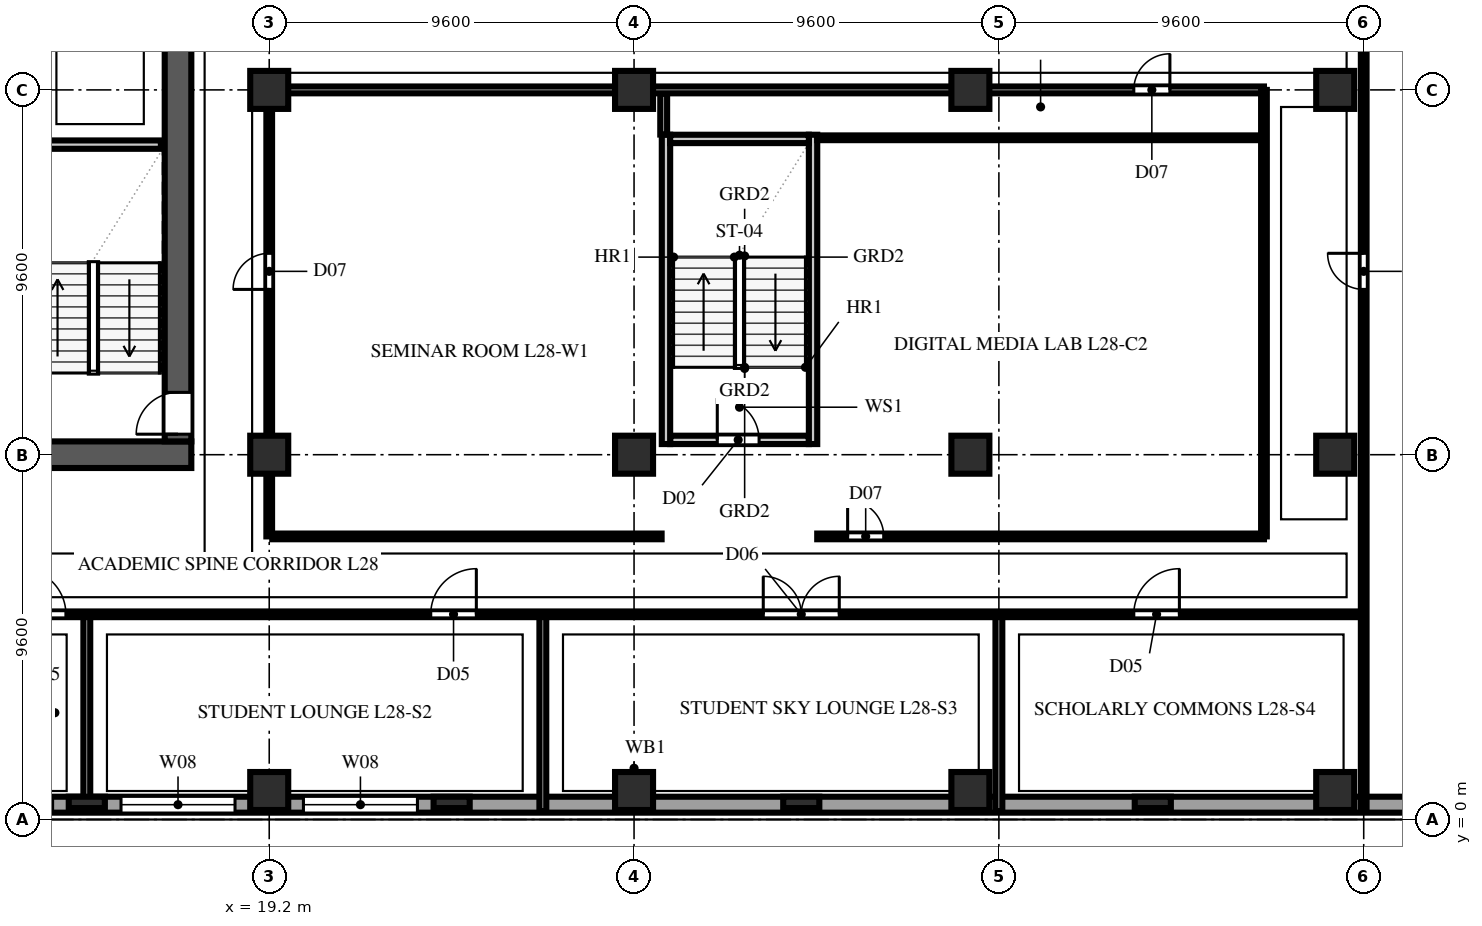
"""IFC4 building model, lengths in metres.
Left out: names, types, materials, properties, quantities, classifications, styles, units other than length and angle.
Written with IfcOpenShell. Run it as: python <this file> out.ifc"""

import sys

from ifc_helpers import new_model, si_unit, direction, frame, frame_2d, origin, origin_2d, place, context, subcontext, project, spatial, rectangle, extrude, element, fill, save


model = new_model("IFC4")
c1 = context("Model", 3, precision=1e-05, world=origin(), true_north=direction((0.0, 1.0)))
c2 = subcontext(c1, "Body", "Model", "MODEL_VIEW")
j1 = project(units=[si_unit("LENGTHUNIT", "METRE"), si_unit("PLANEANGLEUNIT", "RADIAN")], contexts=[c1])
p1 = place(None, origin())
s1 = spatial("IfcSite", under=j1, at=p1, CompositionType="ELEMENT")
p2 = place(p1, origin())
s2 = spatial("IfcBuilding", under=s1, at=p2, CompositionType="ELEMENT")
p3 = place(p2, frame((0.0, 0.0, 112.8)))
s3 = spatial("IfcBuildingStorey", under=s2, at=p3, CompositionType="ELEMENT", Elevation=112.8)
p4 = place(p3, frame((2.55, 9.6, 0.0), z_axis=(0.0, 0.0, 1.0), x_axis=(1.0, 0.0, 0.0)))
e1 = element("IfcWall", 1, at=p4, inside=s3, PredefinedType="SHEAR", context=c2, shape_type="SweptSolid", body=[
    extrude(rectangle(XDim=14.6, YDim=0.7, at=frame_2d((7.3, 0.0))), origin(), (0.0, 0.0, 1.0), 3.54),
])
p5 = place(p3, frame((16.8, 9.95, 0.0), z_axis=(0.0, 0.0, 1.0), x_axis=(0.0, 1.0, 0.0)))
e2 = element("IfcWall", 2, at=p5, inside=s3, PredefinedType="SHEAR", context=c2, shape_type="SweptSolid", body=[
    extrude(rectangle(XDim=12.45, YDim=0.7, at=frame_2d((6.225, 0.0))), origin(), (0.0, 0.0, 1.0), 3.54),
])
p6 = place(p5, frame((0.19, 0.0, 0.0)))
e3 = element("IfcOpeningElement", 3, at=p6, cuts=e2, PredefinedType="OPENING", context=c2, shape_type="SweptSolid", body=[
    extrude(rectangle(XDim=1.1, YDim=2.2, at=frame_2d((0.55, 1.1))), frame((0.0, 0.362, 0.0), z_axis=(0.0, -1.0, 0.0), x_axis=(1.0, 0.0, 0.0)), (0.0, 0.0, 1.0), 0.724),
])
for number, where, z_axis, x_axis in (
    (4, (19.2, 0.75, 0.0), (0.0, 0.0, 1.0), (1.0, 0.0, 0.0)),
    (5, (19.2, 9.6, 0.0), (0.0, 0.0, 1.0), (1.0, 0.0, 0.0)),
    (6, (19.2, 19.2, 0.0), (0.0, 0.0, 1.0), (1.0, 0.0, 0.0)),
    (7, (28.8, 0.75, 0.0), (0.0, 0.0, 1.0), (1.0, 0.0, 0.0)),
    (8, (28.8, 9.6, 0.0), (0.0, 0.0, 1.0), (1.0, 0.0, 0.0)),
    (9, (28.8, 19.2, 0.0), (0.0, 0.0, 1.0), (1.0, 0.0, 0.0)),
    (10, (37.65, 0.75, 0.0), (0.0, 0.0, 1.0), (1.0, 0.0, 0.0)),
    (11, (37.65, 9.6, 0.0), (0.0, 0.0, 1.0), (1.0, 0.0, 0.0)),
    (12, (37.65, 19.2, 0.0), (0.0, 0.0, 1.0), (1.0, 0.0, 0.0)),
    (13, (47.25, 0.75, 0.0), (0.0, 0.0, 1.0), (1.0, 0.0, 0.0)),
    (14, (47.25, 9.6, 0.0), (0.0, 0.0, 1.0), (1.0, 0.0, 0.0)),
    (15, (47.25, 19.2, 0.0), (0.0, 0.0, 1.0), (1.0, 0.0, 0.0)),
):
    element("IfcColumn", number, at=place(p3, frame(where, z_axis=z_axis, x_axis=x_axis)), inside=s3, PredefinedType="COLUMN", context=c2, shape_type="SweptSolid", body=[
        extrude(rectangle(XDim=1.0, YDim=1.0, at=origin_2d()), origin(), (0.0, 0.0, 1.0), 3.8),
    ])
for number, where, z_axis, x_axis in (
    (16, (14.4, 0.45, 0.0), (0.0, 0.0, 1.0), (1.0, 0.0, 0.0)),
    (17, (24.0, 0.45, 0.0), (0.0, 0.0, 1.0), (1.0, 0.0, 0.0)),
    (18, (33.2, 0.45, 0.0), (0.0, 0.0, 1.0), (1.0, 0.0, 0.0)),
    (19, (42.45, 0.45, 0.0), (0.0, 0.0, 1.0), (1.0, 0.0, 0.0)),
):
    element("IfcColumn", number, at=place(p3, frame(where, z_axis=z_axis, x_axis=x_axis)), inside=s3, PredefinedType="PILASTER", context=c2, shape_type="SweptSolid", body=[
        extrude(rectangle(XDim=0.95, YDim=0.3, at=origin_2d()), origin(), (0.0, 0.0, 1.0), 3.8),
    ])
p7 = place(p3, frame((1.84, 0.39, 0.0), z_axis=(0.0, 0.0, 1.0), x_axis=(1.0, 0.0, 0.0)))
e20 = element("IfcWall", 20, at=p7, inside=s3, PredefinedType="SOLIDWALL", context=c2, shape_type="SweptSolid", body=[
    extrude(rectangle(XDim=53.92, YDim=0.42, at=frame_2d((26.96, 0.0))), origin(), (0.0, 0.0, 1.0), 3.54),
])
p8 = place(p7, frame((3.86, 0.0, 0.75)))
e21 = element("IfcOpeningElement", 21, at=p8, cuts=e20, PredefinedType="OPENING", context=c2, shape_type="SweptSolid", body=[
    extrude(rectangle(XDim=3.0, YDim=1.9, at=frame_2d((1.5, 0.95))), frame((0.0, 0.222, 0.0), z_axis=(0.0, -1.0, 0.0), x_axis=(1.0, 0.0, 0.0)), (0.0, 0.0, 1.0), 0.444),
])
p9 = place(p7, frame((8.66, 0.0, 0.75)))
e22 = element("IfcOpeningElement", 22, at=p9, cuts=e20, PredefinedType="OPENING", context=c2, shape_type="SweptSolid", body=[
    extrude(rectangle(XDim=3.0, YDim=1.9, at=frame_2d((1.5, 0.95))), frame((0.0, 0.222, 0.0), z_axis=(0.0, -1.0, 0.0), x_axis=(1.0, 0.0, 0.0)), (0.0, 0.0, 1.0), 0.444),
])
p10 = place(p7, frame((13.46, 0.0, 0.75)))
e23 = element("IfcOpeningElement", 23, at=p10, cuts=e20, PredefinedType="OPENING", context=c2, shape_type="SweptSolid", body=[
    extrude(rectangle(XDim=3.0, YDim=1.9, at=frame_2d((1.5, 0.95))), frame((0.0, 0.222, 0.0), z_axis=(0.0, -1.0, 0.0), x_axis=(1.0, 0.0, 0.0)), (0.0, 0.0, 1.0), 0.444),
])
p11 = place(p7, frame((18.26, 0.0, 0.75)))
e24 = element("IfcOpeningElement", 24, at=p11, cuts=e20, PredefinedType="OPENING", context=c2, shape_type="SweptSolid", body=[
    extrude(rectangle(XDim=3.0, YDim=1.9, at=frame_2d((1.5, 0.95))), frame((0.0, 0.222, 0.0), z_axis=(0.0, -1.0, 0.0), x_axis=(1.0, 0.0, 0.0)), (0.0, 0.0, 1.0), 0.444),
])
p12 = place(p3, frame((12.75, 17.76, 0.0), z_axis=(0.0, 0.0, 1.0), x_axis=(1.0, 0.0, 0.0)))
e25 = element("IfcWall", 25, at=p12, inside=s3, PredefinedType="SOLIDWALL", context=c2, shape_type="SweptSolid", body=[
    extrude(rectangle(XDim=3.6, YDim=0.22, at=frame_2d((1.8, 0.0))), origin(), (0.0, 0.0, 1.0), 3.54),
])
p13 = place(p3, frame((29.75, 9.99, 0.0), z_axis=(0.0, 0.0, 1.0), x_axis=(1.0, 0.0, 0.0)))
e26 = element("IfcWall", 26, at=p13, inside=s3, PredefinedType="SOLIDWALL", context=c2, shape_type="SweptSolid", body=[
    extrude(rectangle(XDim=3.65, YDim=0.22, at=frame_2d((1.825, 0.0))), origin(), (0.0, 0.0, 1.0), 3.54),
])
p14 = place(p13, frame((1.24, 0.0, 0.0)))
e27 = element("IfcOpeningElement", 27, at=p14, cuts=e26, PredefinedType="OPENING", context=c2, shape_type="SweptSolid", body=[
    extrude(rectangle(XDim=1.1, YDim=2.2, at=frame_2d((0.55, 1.1))), frame((0.0, 0.122, 0.0), z_axis=(0.0, -1.0, 0.0), x_axis=(1.0, 0.0, 0.0)), (0.0, 0.0, 1.0), 0.244),
])
for number, where, z_axis, x_axis in (
    (28, (29.64, 9.88, 0.0), (0.0, 0.0, 1.0), (0.0, 1.0, 0.0)),
    (29, (33.51, 9.88, 0.0), (0.0, 0.0, 1.0), (0.0, 1.0, 0.0)),
):
    element("IfcWall", number, at=place(p3, frame(where, z_axis=z_axis, x_axis=x_axis)), inside=s3, PredefinedType="SOLIDWALL", context=c2, shape_type="SweptSolid", body=[
        extrude(rectangle(XDim=8.14, YDim=0.22, at=frame_2d((4.07, 0.0))), origin(), (0.0, 0.0, 1.0), 3.54),
    ])
p15 = place(p3, frame((29.75, 17.91, 0.0), z_axis=(0.0, 0.0, 1.0), x_axis=(1.0, 0.0, 0.0)))
e30 = element("IfcWall", 30, at=p15, inside=s3, PredefinedType="SOLIDWALL", context=c2, shape_type="SweptSolid", body=[
    extrude(rectangle(XDim=3.65, YDim=0.22, at=frame_2d((1.825, 0.0))), origin(), (0.0, 0.0, 1.0), 3.54),
])
for number, where, z_axis, x_axis in (
    (31, (14.4, 0.22, 0.0), (0.0, 0.0, 1.0), (0.0, 1.0, 0.0)),
    (32, (26.4, 0.22, 0.0), (0.0, 0.0, 1.0), (0.0, 1.0, 0.0)),
    (33, (38.4, 0.22, 0.0), (0.0, 0.0, 1.0), (0.0, 1.0, 0.0)),
):
    element("IfcWall", number, at=place(p3, frame(where, z_axis=z_axis, x_axis=x_axis)), inside=s3, PredefinedType="PARTITIONING", context=c2, shape_type="SweptSolid", body=[
        extrude(rectangle(XDim=5.18, YDim=0.18, at=frame_2d((2.59, 0.0))), origin(), (0.0, 0.0, 1.0), 3.54),
    ])
p16 = place(p3, frame((0.22, 5.4, 0.0), z_axis=(0.0, 0.0, 1.0), x_axis=(1.0, 0.0, 0.0)))
e34 = element("IfcWall", 34, at=p16, inside=s3, PredefinedType="PARTITIONING", context=c2, shape_type="SweptSolid", body=[
    extrude(rectangle(XDim=47.78, YDim=0.15, at=frame_2d((23.89, 0.0))), origin(), (0.0, 0.0, 1.0), 3.54),
])
p17 = place(p16, frame((12.43, 0.0, 0.0)))
e35 = element("IfcOpeningElement", 35, at=p17, cuts=e34, PredefinedType="OPENING", context=c2, shape_type="SweptSolid", body=[
    extrude(rectangle(XDim=1.2, YDim=2.2, at=frame_2d((0.6, 1.1))), frame((0.0, 0.087, 0.0), z_axis=(0.0, -1.0, 0.0), x_axis=(1.0, 0.0, 0.0)), (0.0, 0.0, 1.0), 0.174),
])
p18 = place(p16, frame((23.23, 0.0, 0.0)))
e36 = element("IfcOpeningElement", 36, at=p18, cuts=e34, PredefinedType="OPENING", context=c2, shape_type="SweptSolid", body=[
    extrude(rectangle(XDim=1.2, YDim=2.2, at=frame_2d((0.6, 1.1))), frame((0.0, 0.087, 0.0), z_axis=(0.0, -1.0, 0.0), x_axis=(1.0, 0.0, 0.0)), (0.0, 0.0, 1.0), 0.174),
])
p19 = place(p16, frame((31.98, 0.0, 0.0)))
e37 = element("IfcOpeningElement", 37, at=p19, cuts=e34, PredefinedType="OPENING", context=c2, shape_type="SweptSolid", body=[
    extrude(rectangle(XDim=2.0, YDim=2.3, at=frame_2d((1.0, 1.15))), frame((0.0, 0.087, 0.0), z_axis=(0.0, -1.0, 0.0), x_axis=(1.0, 0.0, 0.0)), (0.0, 0.0, 1.0), 0.174),
])
p20 = place(p16, frame((41.73, 0.0, 0.0)))
e38 = element("IfcOpeningElement", 38, at=p20, cuts=e34, PredefinedType="OPENING", context=c2, shape_type="SweptSolid", body=[
    extrude(rectangle(XDim=1.2, YDim=2.2, at=frame_2d((0.6, 1.1))), frame((0.0, 0.087, 0.0), z_axis=(0.0, -1.0, 0.0), x_axis=(1.0, 0.0, 0.0)), (0.0, 0.0, 1.0), 0.174),
])
p21 = place(p3, frame((48.0, 0.22, 0.0), z_axis=(0.0, 0.0, 1.0), x_axis=(0.0, 1.0, 0.0)))
e39 = element("IfcWall", 39, at=p21, inside=s3, PredefinedType="PARTITIONING", context=c2, shape_type="SweptSolid", body=[
    extrude(rectangle(XDim=37.96, YDim=0.15, at=frame_2d((18.98, 0.0))), origin(), (0.0, 0.0, 1.0), 3.54),
])
p22 = place(p21, frame((13.73, 0.0, 0.0)))
e40 = element("IfcOpeningElement", 40, at=p22, cuts=e39, PredefinedType="OPENING", context=c2, shape_type="SweptSolid", body=[
    extrude(rectangle(XDim=0.95, YDim=2.15, at=frame_2d((0.475, 1.075))), frame((0.0, 0.087, 0.0), z_axis=(0.0, -1.0, 0.0), x_axis=(1.0, 0.0, 0.0)), (0.0, 0.0, 1.0), 0.174),
])
p23 = place(p3, frame((19.2, 7.45, 0.0), z_axis=(0.0, 0.0, 1.0), x_axis=(0.0, 1.0, 0.0)))
e41 = element("IfcWall", 41, at=p23, inside=s3, PredefinedType="PARTITIONING", context=c2, shape_type="SweptSolid", body=[
    extrude(rectangle(XDim=11.75, YDim=0.15, at=frame_2d((5.875, 0.0))), origin(), (0.0, 0.0, 1.0), 2.845),
])
p24 = place(p23, frame((6.5, 0.0, 0.0)))
e42 = element("IfcOpeningElement", 42, at=p24, cuts=e41, PredefinedType="OPENING", context=c2, shape_type="SweptSolid", body=[
    extrude(rectangle(XDim=0.95, YDim=2.15, at=frame_2d((0.475, 1.075))), frame((0.0, 0.087, 0.0), z_axis=(0.0, -1.0, 0.0), x_axis=(1.0, 0.0, 0.0)), (0.0, 0.0, 1.0), 0.174),
])
p25 = place(p3, frame((29.58, 18.025, 0.0), z_axis=(0.0, 0.0, 1.0), x_axis=(0.0, 1.0, 0.0)))
e43 = element("IfcWall", 43, at=p25, inside=s3, PredefinedType="PARTITIONING", context=c2, shape_type="SweptSolid", body=[
    extrude(rectangle(XDim=1.08, YDim=0.18, at=frame_2d((0.54, 0.0))), origin(), (0.0, 0.0, 1.0), 3.54),
])
p26 = place(p3, frame((19.28, 19.2, 0.0), z_axis=(0.0, 0.0, 1.0), x_axis=(1.0, 0.0, 0.0)))
e44 = element("IfcWall", 44, at=p26, inside=s3, PredefinedType="PARTITIONING", context=c2, shape_type="SweptSolid", body=[
    extrude(rectangle(XDim=26.095, YDim=0.18, at=frame_2d((13.047, 0.0))), origin(), (0.0, 0.0, 1.0), 2.845),
])
p27 = place(p26, frame((22.67, 0.0, 0.0)))
e45 = element("IfcOpeningElement", 45, at=p27, cuts=e44, PredefinedType="OPENING", context=c2, shape_type="SweptSolid", body=[
    extrude(rectangle(XDim=0.95, YDim=2.15, at=frame_2d((0.475, 1.075))), frame((0.0, 0.102, 0.0), z_axis=(0.0, -1.0, 0.0), x_axis=(1.0, 0.0, 0.0)), (0.0, 0.0, 1.0), 0.204),
])
p28 = place(p3, frame((19.28, 7.45, 0.0), z_axis=(0.0, 0.0, 1.0), x_axis=(1.0, 0.0, 0.0)))
e46 = element("IfcWall", 46, at=p28, inside=s3, PredefinedType="PARTITIONING", context=c2, shape_type="SweptSolid", body=[
    extrude(rectangle(XDim=10.245, YDim=0.15, at=frame_2d((5.123, 0.0))), origin(), (0.0, 0.0, 1.0), 3.54),
])
p29 = place(p3, frame((33.62, 17.94, 0.0), z_axis=(0.0, 0.0, 1.0), x_axis=(1.0, 0.0, 0.0)))
e47 = element("IfcWall", 47, at=p29, inside=s3, PredefinedType="PARTITIONING", context=c2, shape_type="SweptSolid", body=[
    extrude(rectangle(XDim=11.755, YDim=0.125, at=frame_2d((5.877, 0.0))), origin(), (0.0, 0.0, 1.0), 3.54),
])
p30 = place(p3, frame((33.62, 7.45, 0.0), z_axis=(0.0, 0.0, 1.0), x_axis=(1.0, 0.0, 0.0)))
e48 = element("IfcWall", 48, at=p30, inside=s3, PredefinedType="PARTITIONING", context=c2, shape_type="SweptSolid", body=[
    extrude(rectangle(XDim=11.755, YDim=0.15, at=frame_2d((5.877, 0.0))), origin(), (0.0, 0.0, 1.0), 3.54),
])
p31 = place(p30, frame((0.8, 0.0, 0.0)))
e49 = element("IfcOpeningElement", 49, at=p31, cuts=e48, PredefinedType="OPENING", context=c2, shape_type="SweptSolid", body=[
    extrude(rectangle(XDim=0.95, YDim=2.15, at=frame_2d((0.475, 1.075))), frame((0.0, 0.087, 0.0), z_axis=(0.0, -1.0, 0.0), x_axis=(1.0, 0.0, 0.0)), (0.0, 0.0, 1.0), 0.174),
])
p32 = place(p3, frame((45.375, 7.45, 0.0), z_axis=(0.0, 0.0, 1.0), x_axis=(0.0, 1.0, 0.0)))
e50 = element("IfcWall", 50, at=p32, inside=s3, PredefinedType="PARTITIONING", context=c2, shape_type="SweptSolid", body=[
    extrude(rectangle(XDim=11.75, YDim=0.15, at=frame_2d((5.875, 0.0))), origin(), (0.0, 0.0, 1.0), 3.54),
])
p33 = place(p9, origin())
e51 = element("IfcWindow", 51, at=p33, inside=s3, PartitioningType="TRIPLE_PANEL_VERTICAL", PredefinedType="WINDOW", context=c2, shape_type="SweptSolid", body=[
    extrude(rectangle(XDim=3.0, YDim=1.9, at=frame_2d((1.5, 0.95))), frame((0.0, 0.11, 0.0), z_axis=(0.0, -1.0, 0.0), x_axis=(1.0, 0.0, 0.0)), (0.0, 0.0, 1.0), 0.06),
])
fill(e22, e51)
p34 = place(p10, origin())
e52 = element("IfcWindow", 52, at=p34, inside=s3, PartitioningType="TRIPLE_PANEL_VERTICAL", PredefinedType="WINDOW", context=c2, shape_type="SweptSolid", body=[
    extrude(rectangle(XDim=3.0, YDim=1.9, at=frame_2d((1.5, 0.95))), frame((0.0, 0.11, 0.0), z_axis=(0.0, -1.0, 0.0), x_axis=(1.0, 0.0, 0.0)), (0.0, 0.0, 1.0), 0.06),
])
fill(e23, e52)
p35 = place(p11, origin())
e53 = element("IfcWindow", 53, at=p35, inside=s3, PartitioningType="TRIPLE_PANEL_VERTICAL", PredefinedType="WINDOW", context=c2, shape_type="SweptSolid", body=[
    extrude(rectangle(XDim=3.0, YDim=1.9, at=frame_2d((1.5, 0.95))), frame((0.0, 0.11, 0.0), z_axis=(0.0, -1.0, 0.0), x_axis=(1.0, 0.0, 0.0)), (0.0, 0.0, 1.0), 0.06),
])
fill(e24, e53)
p36 = place(p6, origin())
e54 = element("IfcDoor", 54, at=p36, inside=s3, OperationType="SINGLE_SWING_LEFT", PredefinedType="DOOR", context=c2, shape_type="SweptSolid", body=[
    extrude(rectangle(XDim=1.1, YDim=2.2, at=frame_2d((0.55, 1.1))), frame((0.0, 0.025, 0.0), z_axis=(0.0, -1.0, 0.0), x_axis=(1.0, 0.0, 0.0)), (0.0, 0.0, 1.0), 0.05),
])
fill(e3, e54)
p37 = place(p14, origin())
e55 = element("IfcDoor", 55, at=p37, inside=s3, OperationType="SINGLE_SWING_LEFT", PredefinedType="DOOR", context=c2, shape_type="SweptSolid", body=[
    extrude(rectangle(XDim=1.1, YDim=2.2, at=frame_2d((0.55, 1.1))), frame((0.0, 0.025, 0.0), z_axis=(0.0, -1.0, 0.0), x_axis=(1.0, 0.0, 0.0)), (0.0, 0.0, 1.0), 0.05),
])
fill(e27, e55)
p38 = place(p17, origin())
e56 = element("IfcDoor", 56, at=p38, inside=s3, OperationType="SINGLE_SWING_LEFT", PredefinedType="DOOR", context=c2, shape_type="SweptSolid", body=[
    extrude(rectangle(XDim=1.2, YDim=2.2, at=frame_2d((0.6, 1.1))), frame((0.0, 0.025, 0.0), z_axis=(0.0, -1.0, 0.0), x_axis=(1.0, 0.0, 0.0)), (0.0, 0.0, 1.0), 0.05),
])
fill(e35, e56)
p39 = place(p18, origin())
e57 = element("IfcDoor", 57, at=p39, inside=s3, OperationType="SINGLE_SWING_RIGHT", PredefinedType="DOOR", context=c2, shape_type="SweptSolid", body=[
    extrude(rectangle(XDim=1.2, YDim=2.2, at=frame_2d((0.6, 1.1))), frame((0.0, 0.025, 0.0), z_axis=(0.0, -1.0, 0.0), x_axis=(1.0, 0.0, 0.0)), (0.0, 0.0, 1.0), 0.05),
])
fill(e36, e57)
p40 = place(p19, origin())
e58 = element("IfcDoor", 58, at=p40, inside=s3, OperationType="DOUBLE_SWING_LEFT", PredefinedType="DOOR", context=c2, shape_type="SweptSolid", body=[
    extrude(rectangle(XDim=2.0, YDim=2.3, at=frame_2d((1.0, 1.15))), frame((0.0, 0.025, 0.0), z_axis=(0.0, -1.0, 0.0), x_axis=(1.0, 0.0, 0.0)), (0.0, 0.0, 1.0), 0.05),
])
fill(e37, e58)
p41 = place(p20, origin())
e59 = element("IfcDoor", 59, at=p41, inside=s3, OperationType="SINGLE_SWING_RIGHT", PredefinedType="DOOR", context=c2, shape_type="SweptSolid", body=[
    extrude(rectangle(XDim=1.2, YDim=2.2, at=frame_2d((0.6, 1.1))), frame((0.0, 0.025, 0.0), z_axis=(0.0, -1.0, 0.0), x_axis=(1.0, 0.0, 0.0)), (0.0, 0.0, 1.0), 0.05),
])
fill(e38, e59)
p42 = place(p22, origin())
e60 = element("IfcDoor", 60, at=p42, inside=s3, OperationType="SINGLE_SWING_RIGHT", PredefinedType="DOOR", context=c2, shape_type="SweptSolid", body=[
    extrude(rectangle(XDim=0.95, YDim=2.15, at=frame_2d((0.475, 1.075))), frame((0.0, 0.025, 0.0), z_axis=(0.0, -1.0, 0.0), x_axis=(1.0, 0.0, 0.0)), (0.0, 0.0, 1.0), 0.05),
])
fill(e40, e60)
p43 = place(p24, origin())
e61 = element("IfcDoor", 61, at=p43, inside=s3, OperationType="SINGLE_SWING_LEFT", PredefinedType="DOOR", context=c2, shape_type="SweptSolid", body=[
    extrude(rectangle(XDim=0.95, YDim=2.15, at=frame_2d((0.475, 1.075))), frame((0.0, 0.025, 0.0), z_axis=(0.0, -1.0, 0.0), x_axis=(1.0, 0.0, 0.0)), (0.0, 0.0, 1.0), 0.05),
])
fill(e42, e61)
p44 = place(p27, origin())
e62 = element("IfcDoor", 62, at=p44, inside=s3, OperationType="SINGLE_SWING_RIGHT", PredefinedType="DOOR", context=c2, shape_type="SweptSolid", body=[
    extrude(rectangle(XDim=0.95, YDim=2.15, at=frame_2d((0.475, 1.075))), frame((0.0, 0.025, 0.0), z_axis=(0.0, -1.0, 0.0), x_axis=(1.0, 0.0, 0.0)), (0.0, 0.0, 1.0), 0.05),
])
fill(e45, e62)
p45 = place(p31, origin())
e63 = element("IfcDoor", 63, at=p45, inside=s3, OperationType="SINGLE_SWING_LEFT", PredefinedType="DOOR", context=c2, shape_type="SweptSolid", body=[
    extrude(rectangle(XDim=0.95, YDim=2.15, at=frame_2d((0.475, 1.075))), frame((0.0, 0.025, 0.0), z_axis=(0.0, -1.0, 0.0), x_axis=(1.0, 0.0, 0.0)), (0.0, 0.0, 1.0), 0.05),
])
fill(e49, e63)
save(model, sys.argv[1])
